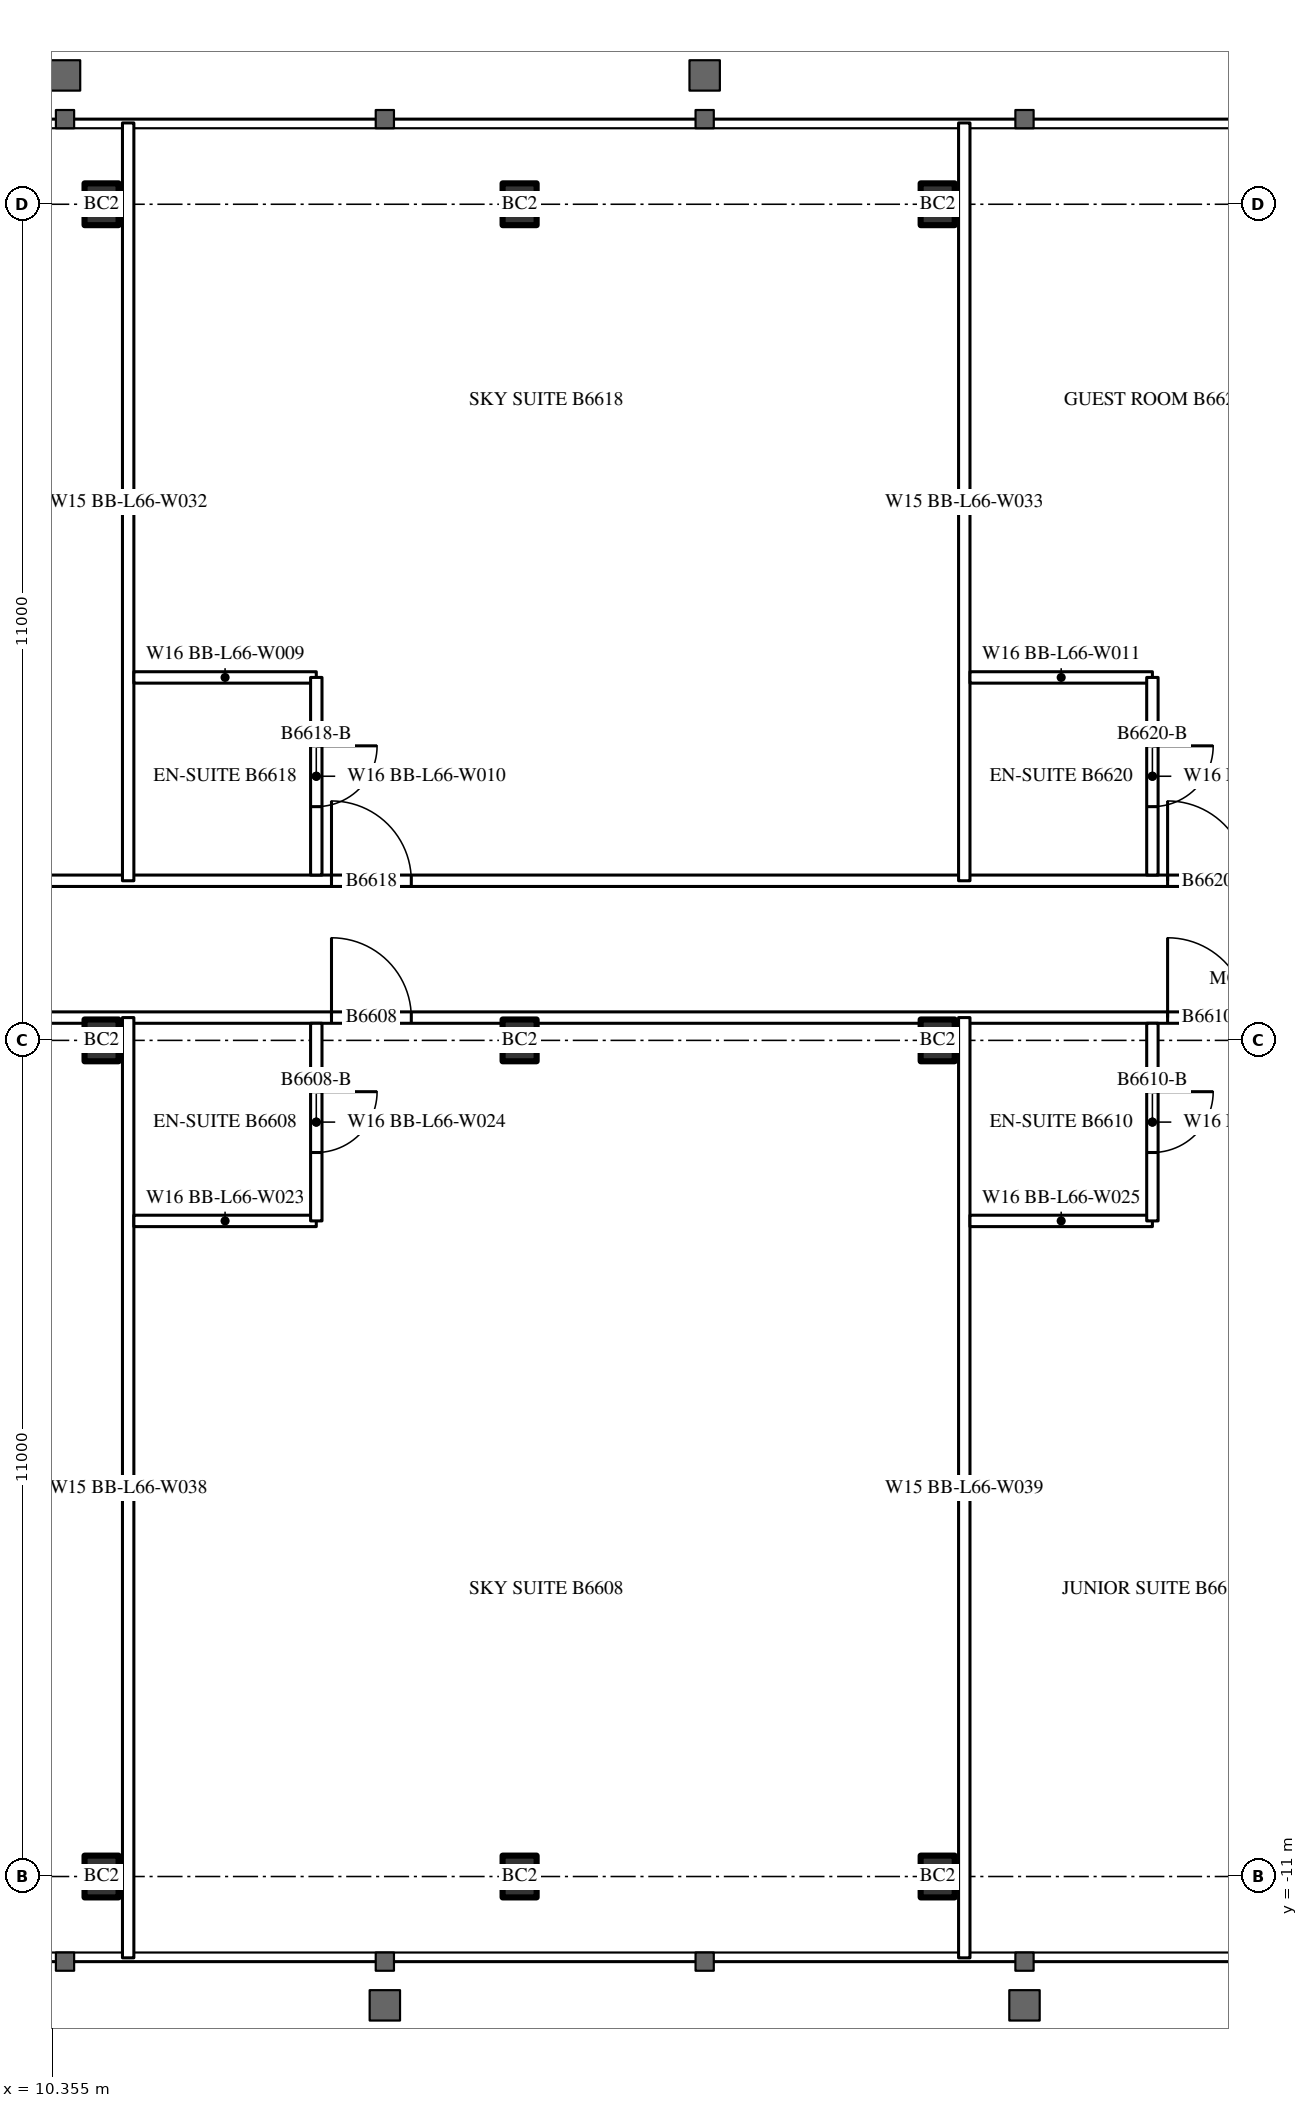
"""IFC4 building model, lengths in metres.
Left out: names, types, materials, properties, quantities, classifications, styles, units other than length and angle.
Written with IfcOpenShell. Run it as: python <this file> out.ifc"""

import sys

from ifc_helpers import new_model, si_unit, direction, frame, frame_2d, origin, origin_2d, place, context, subcontext, project, spatial, rectangle, i_section, extrude, element, fill, save


model = new_model("IFC4")
c1 = context("Model", 3, precision=1e-05, world=origin(), true_north=direction((0.0, 1.0)))
c2 = subcontext(c1, "Body", "Model", "MODEL_VIEW")
j1 = project(units=[si_unit("LENGTHUNIT", "METRE"), si_unit("PLANEANGLEUNIT", "RADIAN")], contexts=[c1])
p1 = place(None, origin())
s1 = spatial("IfcSite", under=j1, at=p1, CompositionType="ELEMENT")
p2 = place(p1, origin())
s2 = spatial("IfcBuilding", under=s1, at=p2, CompositionType="ELEMENT")
p3 = place(p2, frame((0.0, 0.0, 247.7)))
s3 = spatial("IfcBuildingStorey", under=s2, at=p3, CompositionType="ELEMENT", Elevation=247.7)
for number, where, z_axis, x_axis in (
    (1, (11.0, -11.0, 0.0), (0.0, 0.0, 1.0), (1.0, 0.0, 0.0)),
    (2, (16.5, -11.0, 0.0), (0.0, 0.0, 1.0), (1.0, 0.0, 0.0)),
    (3, (22.0, -11.0, 0.0), (0.0, 0.0, 1.0), (1.0, 0.0, 0.0)),
    (4, (11.0, 0.0, 0.0), (0.0, 0.0, 1.0), (1.0, 0.0, 0.0)),
    (5, (16.5, 0.0, 0.0), (0.0, 0.0, 1.0), (1.0, 0.0, 0.0)),
    (6, (22.0, 0.0, 0.0), (0.0, 0.0, 1.0), (1.0, 0.0, 0.0)),
    (7, (11.0, 11.0, 0.0), (0.0, 0.0, 1.0), (1.0, 0.0, 0.0)),
    (8, (16.5, 11.0, 0.0), (0.0, 0.0, 1.0), (1.0, 0.0, 0.0)),
    (9, (22.0, 11.0, 0.0), (0.0, 0.0, 1.0), (1.0, 0.0, 0.0)),
):
    element("IfcColumn", number, at=place(p3, frame(where, z_axis=z_axis, x_axis=x_axis)), inside=s3, PredefinedType="COLUMN", context=c2, shape_type="SweptSolid", body=[
        extrude(i_section(OverallWidth=0.448, OverallDepth=0.55, WebThickness=0.072, FlangeThickness=0.115, FilletRadius=0.02, at=origin_2d()), origin(), (0.0, 0.0, 1.0), 4.2),
    ])
p4 = place(p3, frame((-27.5, 0.3, 0.0), z_axis=(0.0, 0.0, 1.0), x_axis=(1.0, 0.0, 0.0)))
e10 = element("IfcWall", 10, at=p4, inside=s3, PredefinedType="PARTITIONING", context=c2, shape_type="SweptSolid", body=[
    extrude(rectangle(XDim=55.0, YDim=0.15, at=frame_2d((27.5, 0.0))), origin(), (0.0, 0.0, 1.0), 3.0),
])
p5 = place(p4, frame((1.575, 0.0, 0.0)))
e11 = element("IfcOpeningElement", 11, at=p5, cuts=e10, PredefinedType="OPENING", context=c2, shape_type="SweptSolid", body=[
    extrude(rectangle(XDim=1.0, YDim=2.2, at=frame_2d((0.5, 1.1))), frame((0.0, 0.085, 0.0), z_axis=(0.0, -1.0, 0.0), x_axis=(1.0, 0.0, 0.0)), (0.0, 0.0, 1.0), 0.17),
])
p6 = place(p4, frame((8.525, 0.0, 0.0)))
e12 = element("IfcOpeningElement", 12, at=p6, cuts=e10, PredefinedType="OPENING", context=c2, shape_type="SweptSolid", body=[
    extrude(rectangle(XDim=1.05, YDim=2.4, at=frame_2d((0.525, 1.2))), frame((0.0, 0.085, 0.0), z_axis=(0.0, -1.0, 0.0), x_axis=(1.0, 0.0, 0.0)), (0.0, 0.0, 1.0), 0.17),
])
p7 = place(p4, frame((19.525, 0.0, 0.0)))
e13 = element("IfcOpeningElement", 13, at=p7, cuts=e10, PredefinedType="OPENING", context=c2, shape_type="SweptSolid", body=[
    extrude(rectangle(XDim=1.05, YDim=2.4, at=frame_2d((0.525, 1.2))), frame((0.0, 0.085, 0.0), z_axis=(0.0, -1.0, 0.0), x_axis=(1.0, 0.0, 0.0)), (0.0, 0.0, 1.0), 0.17),
])
p8 = place(p4, frame((25.025, 0.0, 0.0)))
e14 = element("IfcOpeningElement", 14, at=p8, cuts=e10, PredefinedType="OPENING", context=c2, shape_type="SweptSolid", body=[
    extrude(rectangle(XDim=1.05, YDim=2.4, at=frame_2d((0.525, 1.2))), frame((0.0, 0.085, 0.0), z_axis=(0.0, -1.0, 0.0), x_axis=(1.0, 0.0, 0.0)), (0.0, 0.0, 1.0), 0.17),
])
p9 = place(p4, frame((30.525, 0.0, 0.0)))
e15 = element("IfcOpeningElement", 15, at=p9, cuts=e10, PredefinedType="OPENING", context=c2, shape_type="SweptSolid", body=[
    extrude(rectangle(XDim=1.05, YDim=2.4, at=frame_2d((0.525, 1.2))), frame((0.0, 0.085, 0.0), z_axis=(0.0, -1.0, 0.0), x_axis=(1.0, 0.0, 0.0)), (0.0, 0.0, 1.0), 0.17),
])
p10 = place(p4, frame((41.525, 0.0, 0.0)))
e16 = element("IfcOpeningElement", 16, at=p10, cuts=e10, PredefinedType="OPENING", context=c2, shape_type="SweptSolid", body=[
    extrude(rectangle(XDim=1.05, YDim=2.4, at=frame_2d((0.525, 1.2))), frame((0.0, 0.085, 0.0), z_axis=(0.0, -1.0, 0.0), x_axis=(1.0, 0.0, 0.0)), (0.0, 0.0, 1.0), 0.17),
])
p11 = place(p4, frame((52.525, 0.0, 0.0)))
e17 = element("IfcOpeningElement", 17, at=p11, cuts=e10, PredefinedType="OPENING", context=c2, shape_type="SweptSolid", body=[
    extrude(rectangle(XDim=1.05, YDim=2.4, at=frame_2d((0.525, 1.2))), frame((0.0, 0.085, 0.0), z_axis=(0.0, -1.0, 0.0), x_axis=(1.0, 0.0, 0.0)), (0.0, 0.0, 1.0), 0.17),
])
p12 = place(p3, frame((-27.5, 2.1, 0.0), z_axis=(0.0, 0.0, 1.0), x_axis=(1.0, 0.0, 0.0)))
e18 = element("IfcWall", 18, at=p12, inside=s3, PredefinedType="PARTITIONING", context=c2, shape_type="SweptSolid", body=[
    extrude(rectangle(XDim=55.0, YDim=0.15, at=frame_2d((27.5, 0.0))), origin(), (0.0, 0.0, 1.0), 4.0),
])
p13 = place(p12, frame((2.025, 0.0, 0.0)))
e19 = element("IfcOpeningElement", 19, at=p13, cuts=e18, PredefinedType="OPENING", context=c2, shape_type="SweptSolid", body=[
    extrude(rectangle(XDim=1.05, YDim=2.4, at=frame_2d((0.525, 1.2))), frame((0.0, 0.085, 0.0), z_axis=(0.0, -1.0, 0.0), x_axis=(1.0, 0.0, 0.0)), (0.0, 0.0, 1.0), 0.17),
])
p14 = place(p12, frame((8.525, 0.0, 0.0)))
e20 = element("IfcOpeningElement", 20, at=p14, cuts=e18, PredefinedType="OPENING", context=c2, shape_type="SweptSolid", body=[
    extrude(rectangle(XDim=1.05, YDim=2.4, at=frame_2d((0.525, 1.2))), frame((0.0, 0.085, 0.0), z_axis=(0.0, -1.0, 0.0), x_axis=(1.0, 0.0, 0.0)), (0.0, 0.0, 1.0), 0.17),
])
p15 = place(p12, frame((19.525, 0.0, 0.0)))
e21 = element("IfcOpeningElement", 21, at=p15, cuts=e18, PredefinedType="OPENING", context=c2, shape_type="SweptSolid", body=[
    extrude(rectangle(XDim=1.05, YDim=2.4, at=frame_2d((0.525, 1.2))), frame((0.0, 0.085, 0.0), z_axis=(0.0, -1.0, 0.0), x_axis=(1.0, 0.0, 0.0)), (0.0, 0.0, 1.0), 0.17),
])
p16 = place(p12, frame((30.525, 0.0, 0.0)))
e22 = element("IfcOpeningElement", 22, at=p16, cuts=e18, PredefinedType="OPENING", context=c2, shape_type="SweptSolid", body=[
    extrude(rectangle(XDim=1.05, YDim=2.4, at=frame_2d((0.525, 1.2))), frame((0.0, 0.085, 0.0), z_axis=(0.0, -1.0, 0.0), x_axis=(1.0, 0.0, 0.0)), (0.0, 0.0, 1.0), 0.17),
])
p17 = place(p12, frame((41.525, 0.0, 0.0)))
e23 = element("IfcOpeningElement", 23, at=p17, cuts=e18, PredefinedType="OPENING", context=c2, shape_type="SweptSolid", body=[
    extrude(rectangle(XDim=1.05, YDim=2.4, at=frame_2d((0.525, 1.2))), frame((0.0, 0.085, 0.0), z_axis=(0.0, -1.0, 0.0), x_axis=(1.0, 0.0, 0.0)), (0.0, 0.0, 1.0), 0.17),
])
p18 = place(p12, frame((52.525, 0.0, 0.0)))
e24 = element("IfcOpeningElement", 24, at=p18, cuts=e18, PredefinedType="OPENING", context=c2, shape_type="SweptSolid", body=[
    extrude(rectangle(XDim=1.05, YDim=2.4, at=frame_2d((0.525, 1.2))), frame((0.0, 0.085, 0.0), z_axis=(0.0, -1.0, 0.0), x_axis=(1.0, 0.0, 0.0)), (0.0, 0.0, 1.0), 0.17),
])
for number, where, z_axis, x_axis in (
    (25, (11.35, -12.07, 0.0), (0.0, 0.0, 1.0), (0.0, 1.0, 0.0)),
    (26, (22.35, -12.07, 0.0), (0.0, 0.0, 1.0), (0.0, 1.0, 0.0)),
):
    element("IfcWall", number, at=place(p3, frame(where, z_axis=z_axis, x_axis=x_axis)), inside=s3, PredefinedType="PARTITIONING", context=c2, shape_type="SweptSolid", body=[
        extrude(rectangle(XDim=12.37, YDim=0.15, at=frame_2d((6.185, 0.0))), origin(), (0.0, 0.0, 1.0), 4.0),
    ])
p19 = place(p3, frame((11.425, -2.375, 0.0), z_axis=(0.0, 0.0, 1.0), x_axis=(1.0, 0.0, 0.0)))
e27 = element("IfcWall", 27, at=p19, inside=s3, PredefinedType="PARTITIONING", context=c2, shape_type="SweptSolid", body=[
    extrude(rectangle(XDim=2.4, YDim=0.15, at=frame_2d((1.2, 0.0))), origin(), (0.0, 0.0, 1.0), 4.0),
])
p20 = place(p3, frame((13.825, -2.375, 0.0), z_axis=(0.0, 0.0, 1.0), x_axis=(0.0, 1.0, 0.0)))
e28 = element("IfcWall", 28, at=p20, inside=s3, PredefinedType="PARTITIONING", context=c2, shape_type="SweptSolid", body=[
    extrude(rectangle(XDim=2.6, YDim=0.15, at=frame_2d((1.3, 0.0))), origin(), (0.0, 0.0, 1.0), 4.0),
])
p21 = place(p20, frame((0.9, 0.0, 0.0)))
e29 = element("IfcOpeningElement", 29, at=p21, cuts=e28, PredefinedType="OPENING", context=c2, shape_type="SweptSolid", body=[
    extrude(rectangle(XDim=0.8, YDim=2.2, at=frame_2d((0.4, 1.1))), frame((0.0, 0.085, 0.0), z_axis=(0.0, -1.0, 0.0), x_axis=(1.0, 0.0, 0.0)), (0.0, 0.0, 1.0), 0.17),
])
p22 = place(p3, frame((22.425, -2.375, 0.0), z_axis=(0.0, 0.0, 1.0), x_axis=(1.0, 0.0, 0.0)))
e30 = element("IfcWall", 30, at=p22, inside=s3, PredefinedType="PARTITIONING", context=c2, shape_type="SweptSolid", body=[
    extrude(rectangle(XDim=2.4, YDim=0.15, at=frame_2d((1.2, 0.0))), origin(), (0.0, 0.0, 1.0), 4.0),
])
p23 = place(p3, frame((24.825, -2.375, 0.0), z_axis=(0.0, 0.0, 1.0), x_axis=(0.0, 1.0, 0.0)))
e31 = element("IfcWall", 31, at=p23, inside=s3, PredefinedType="PARTITIONING", context=c2, shape_type="SweptSolid", body=[
    extrude(rectangle(XDim=2.6, YDim=0.15, at=frame_2d((1.3, 0.0))), origin(), (0.0, 0.0, 1.0), 4.0),
])
p24 = place(p23, frame((0.9, 0.0, 0.0)))
e32 = element("IfcOpeningElement", 32, at=p24, cuts=e31, PredefinedType="OPENING", context=c2, shape_type="SweptSolid", body=[
    extrude(rectangle(XDim=0.8, YDim=2.2, at=frame_2d((0.4, 1.1))), frame((0.0, 0.085, 0.0), z_axis=(0.0, -1.0, 0.0), x_axis=(1.0, 0.0, 0.0)), (0.0, 0.0, 1.0), 0.17),
])
for number, where, z_axis, x_axis in (
    (33, (11.35, 2.1, 0.0), (0.0, 0.0, 1.0), (0.0, 1.0, 0.0)),
    (34, (22.35, 2.1, 0.0), (0.0, 0.0, 1.0), (0.0, 1.0, 0.0)),
):
    element("IfcWall", number, at=place(p3, frame(where, z_axis=z_axis, x_axis=x_axis)), inside=s3, PredefinedType="PARTITIONING", context=c2, shape_type="SweptSolid", body=[
        extrude(rectangle(XDim=9.97, YDim=0.15, at=frame_2d((4.985, 0.0))), origin(), (0.0, 0.0, 1.0), 4.0),
    ])
p25 = place(p3, frame((11.425, 4.775, 0.0), z_axis=(0.0, 0.0, 1.0), x_axis=(1.0, 0.0, 0.0)))
e35 = element("IfcWall", 35, at=p25, inside=s3, PredefinedType="PARTITIONING", context=c2, shape_type="SweptSolid", body=[
    extrude(rectangle(XDim=2.4, YDim=0.15, at=frame_2d((1.2, 0.0))), origin(), (0.0, 0.0, 1.0), 4.0),
])
p26 = place(p3, frame((13.825, 2.175, 0.0), z_axis=(0.0, 0.0, 1.0), x_axis=(0.0, 1.0, 0.0)))
e36 = element("IfcWall", 36, at=p26, inside=s3, PredefinedType="PARTITIONING", context=c2, shape_type="SweptSolid", body=[
    extrude(rectangle(XDim=2.6, YDim=0.15, at=frame_2d((1.3, 0.0))), origin(), (0.0, 0.0, 1.0), 4.0),
])
p27 = place(p26, frame((0.9, 0.0, 0.0)))
e37 = element("IfcOpeningElement", 37, at=p27, cuts=e36, PredefinedType="OPENING", context=c2, shape_type="SweptSolid", body=[
    extrude(rectangle(XDim=0.8, YDim=2.2, at=frame_2d((0.4, 1.1))), frame((0.0, 0.085, 0.0), z_axis=(0.0, -1.0, 0.0), x_axis=(1.0, 0.0, 0.0)), (0.0, 0.0, 1.0), 0.17),
])
p28 = place(p3, frame((22.425, 4.775, 0.0), z_axis=(0.0, 0.0, 1.0), x_axis=(1.0, 0.0, 0.0)))
e38 = element("IfcWall", 38, at=p28, inside=s3, PredefinedType="PARTITIONING", context=c2, shape_type="SweptSolid", body=[
    extrude(rectangle(XDim=2.4, YDim=0.15, at=frame_2d((1.2, 0.0))), origin(), (0.0, 0.0, 1.0), 4.0),
])
p29 = place(p3, frame((24.825, 2.175, 0.0), z_axis=(0.0, 0.0, 1.0), x_axis=(0.0, 1.0, 0.0)))
e39 = element("IfcWall", 39, at=p29, inside=s3, PredefinedType="PARTITIONING", context=c2, shape_type="SweptSolid", body=[
    extrude(rectangle(XDim=2.6, YDim=0.15, at=frame_2d((1.3, 0.0))), origin(), (0.0, 0.0, 1.0), 4.0),
])
p30 = place(p29, frame((0.9, 0.0, 0.0)))
e40 = element("IfcOpeningElement", 40, at=p30, cuts=e39, PredefinedType="OPENING", context=c2, shape_type="SweptSolid", body=[
    extrude(rectangle(XDim=0.8, YDim=2.2, at=frame_2d((0.4, 1.1))), frame((0.0, 0.085, 0.0), z_axis=(0.0, -1.0, 0.0), x_axis=(1.0, 0.0, 0.0)), (0.0, 0.0, 1.0), 0.17),
])
p31 = place(p21, origin())
e41 = element("IfcDoor", 41, at=p31, inside=s3, OperationType="SINGLE_SWING_RIGHT", PredefinedType="DOOR", context=c2, shape_type="SweptSolid", body=[
    extrude(rectangle(XDim=0.8, YDim=2.2, at=frame_2d((0.4, 1.1))), frame((0.0, 0.025, 0.0), z_axis=(0.0, -1.0, 0.0), x_axis=(1.0, 0.0, 0.0)), (0.0, 0.0, 1.0), 0.05),
])
fill(e29, e41)
p32 = place(p10, origin())
e42 = element("IfcDoor", 42, at=p32, inside=s3, OperationType="SINGLE_SWING_LEFT", PredefinedType="DOOR", context=c2, shape_type="SweptSolid", body=[
    extrude(rectangle(XDim=1.05, YDim=2.4, at=frame_2d((0.525, 1.2))), frame((0.0, 0.025, 0.0), z_axis=(0.0, -1.0, 0.0), x_axis=(1.0, 0.0, 0.0)), (0.0, 0.0, 1.0), 0.05),
])
fill(e16, e42)
p33 = place(p24, origin())
e43 = element("IfcDoor", 43, at=p33, inside=s3, OperationType="SINGLE_SWING_RIGHT", PredefinedType="DOOR", context=c2, shape_type="SweptSolid", body=[
    extrude(rectangle(XDim=0.8, YDim=2.2, at=frame_2d((0.4, 1.1))), frame((0.0, 0.025, 0.0), z_axis=(0.0, -1.0, 0.0), x_axis=(1.0, 0.0, 0.0)), (0.0, 0.0, 1.0), 0.05),
])
fill(e32, e43)
p34 = place(p11, origin())
e44 = element("IfcDoor", 44, at=p34, inside=s3, OperationType="SINGLE_SWING_LEFT", PredefinedType="DOOR", context=c2, shape_type="SweptSolid", body=[
    extrude(rectangle(XDim=1.05, YDim=2.4, at=frame_2d((0.525, 1.2))), frame((0.0, 0.025, 0.0), z_axis=(0.0, -1.0, 0.0), x_axis=(1.0, 0.0, 0.0)), (0.0, 0.0, 1.0), 0.05),
])
fill(e17, e44)
p35 = place(p27, origin())
e45 = element("IfcDoor", 45, at=p35, inside=s3, OperationType="SINGLE_SWING_RIGHT", PredefinedType="DOOR", context=c2, shape_type="SweptSolid", body=[
    extrude(rectangle(XDim=0.8, YDim=2.2, at=frame_2d((0.4, 1.1))), frame((0.0, 0.025, 0.0), z_axis=(0.0, -1.0, 0.0), x_axis=(1.0, 0.0, 0.0)), (0.0, 0.0, 1.0), 0.05),
])
fill(e37, e45)
p36 = place(p17, origin())
e46 = element("IfcDoor", 46, at=p36, inside=s3, OperationType="SINGLE_SWING_LEFT", PredefinedType="DOOR", context=c2, shape_type="SweptSolid", body=[
    extrude(rectangle(XDim=1.05, YDim=2.4, at=frame_2d((0.525, 1.2))), frame((0.0, 0.025, 0.0), z_axis=(0.0, -1.0, 0.0), x_axis=(1.0, 0.0, 0.0)), (0.0, 0.0, 1.0), 0.05),
])
fill(e23, e46)
p37 = place(p30, origin())
e47 = element("IfcDoor", 47, at=p37, inside=s3, OperationType="SINGLE_SWING_RIGHT", PredefinedType="DOOR", context=c2, shape_type="SweptSolid", body=[
    extrude(rectangle(XDim=0.8, YDim=2.2, at=frame_2d((0.4, 1.1))), frame((0.0, 0.025, 0.0), z_axis=(0.0, -1.0, 0.0), x_axis=(1.0, 0.0, 0.0)), (0.0, 0.0, 1.0), 0.05),
])
fill(e40, e47)
p38 = place(p18, origin())
e48 = element("IfcDoor", 48, at=p38, inside=s3, OperationType="SINGLE_SWING_LEFT", PredefinedType="DOOR", context=c2, shape_type="SweptSolid", body=[
    extrude(rectangle(XDim=1.05, YDim=2.4, at=frame_2d((0.525, 1.2))), frame((0.0, 0.025, 0.0), z_axis=(0.0, -1.0, 0.0), x_axis=(1.0, 0.0, 0.0)), (0.0, 0.0, 1.0), 0.05),
])
fill(e24, e48)
save(model, sys.argv[1])
